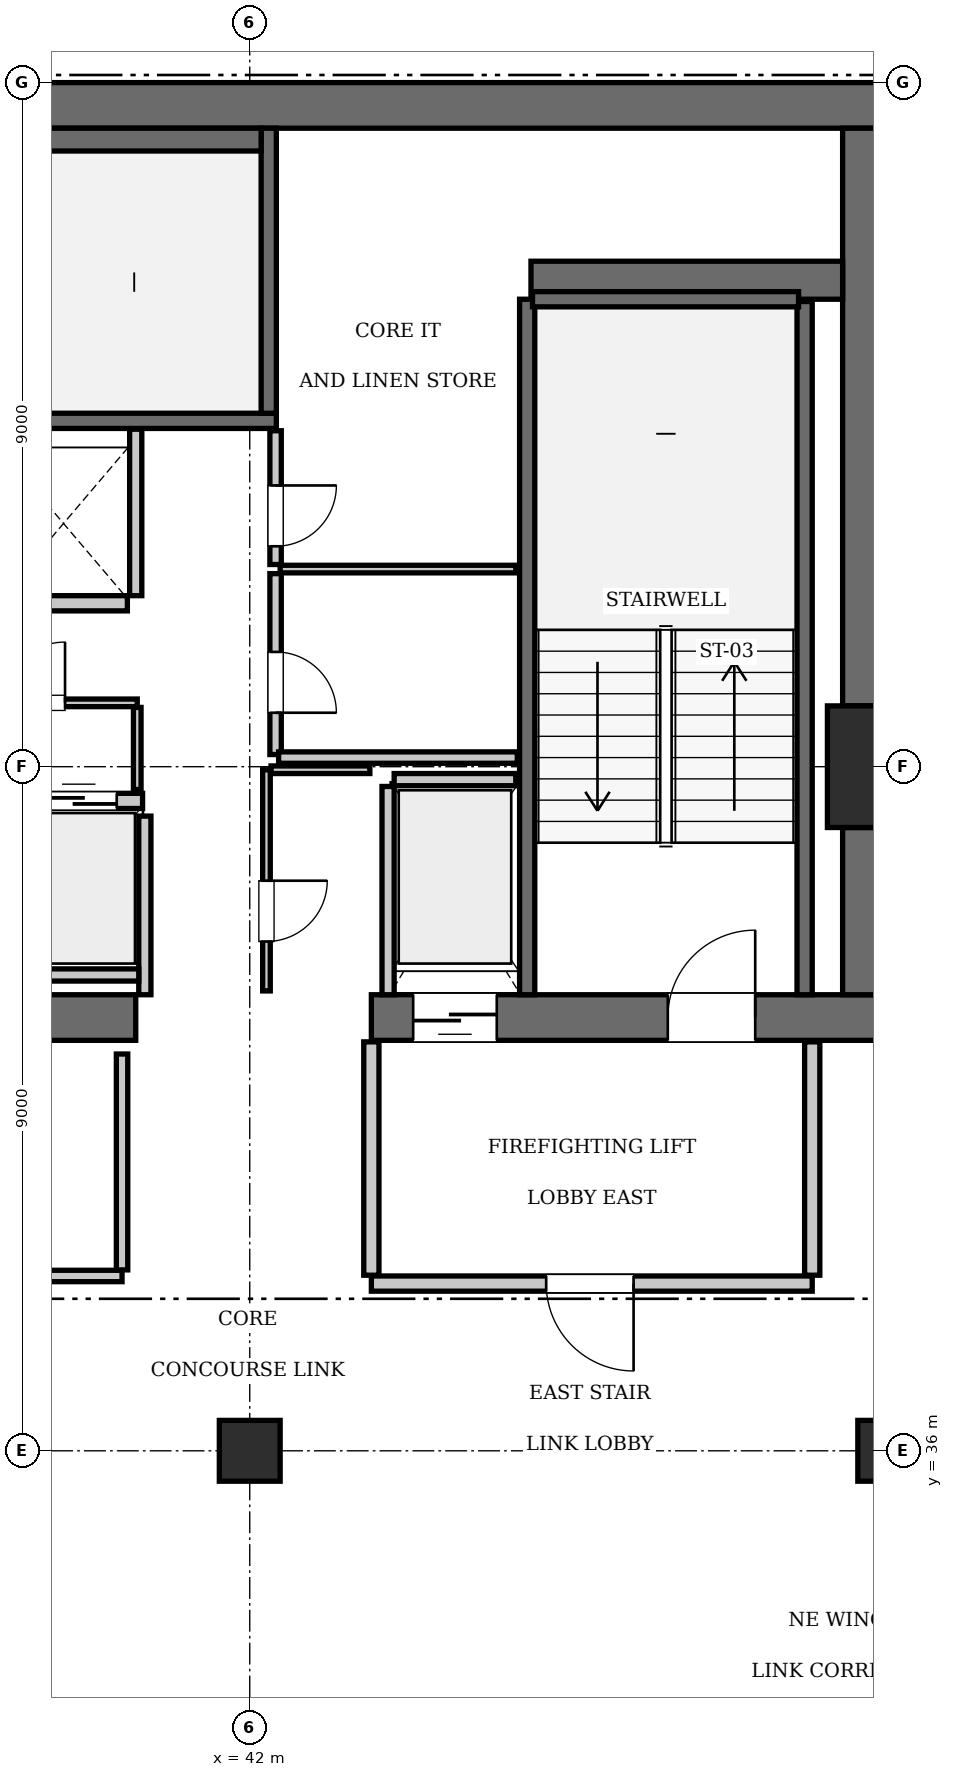
"""IFC4 building model, lengths in metres.
Left out: names, types, materials, properties, quantities, classifications, styles, units other than length and angle.
Written with IfcOpenShell. Run it as: python <this file> out.ifc"""

import sys

from ifc_helpers import new_model, si_unit, direction, frame, frame_2d, origin, origin_2d, place, context, subcontext, project, spatial, rectangle, extrude, element, fill, save


model = new_model("IFC4")
c1 = context("Model", 3, precision=1e-05, world=origin(), true_north=direction((0.0, 1.0)))
c2 = subcontext(c1, "Body", "Model", "MODEL_VIEW")
j1 = project(units=[si_unit("LENGTHUNIT", "METRE"), si_unit("PLANEANGLEUNIT", "RADIAN")], contexts=[c1])
p1 = place(None, origin())
s1 = spatial("IfcSite", under=j1, at=p1, CompositionType="ELEMENT")
p2 = place(p1, origin())
s2 = spatial("IfcBuilding", under=s1, at=p2, CompositionType="ELEMENT")
p3 = place(p2, frame((0.0, 0.0, 254.8)))
s3 = spatial("IfcBuildingStorey", under=s2, at=p3, CompositionType="ELEMENT", Elevation=254.8)
p4 = place(p3, frame((50.4, 45.0, 0.0), z_axis=(0.0, 0.0, 1.0), x_axis=(1.0, 0.0, 0.0)))
e1 = element("IfcColumn", 1, at=p4, inside=s3, PredefinedType="COLUMN", context=c2, shape_type="SweptSolid", body=[
    extrude(rectangle(XDim=1.6, YDim=1.6, at=origin_2d()), origin(), (0.0, 0.0, 1.0), 3.85),
])
p5 = place(p3, frame((25.2, 53.7, 0.0), z_axis=(0.0, 0.0, 1.0), x_axis=(1.0, 0.0, 0.0)))
e2 = element("IfcWall", 2, at=p5, inside=s3, PredefinedType="SHEAR", context=c2, shape_type="SweptSolid", body=[
    extrude(rectangle(XDim=25.2, YDim=0.6, at=frame_2d((12.6, 0.0))), origin(), (0.0, 0.0, 1.0), 3.85),
])
p6 = place(p3, frame((35.1, 41.7, 0.0), z_axis=(0.0, 0.0, 1.0), x_axis=(1.0, 0.0, 0.0)))
e3 = element("IfcWall", 3, at=p6, inside=s3, PredefinedType="SHEAR", context=c2, shape_type="SweptSolid", body=[
    extrude(rectangle(XDim=5.4, YDim=0.6, at=frame_2d((2.7, 0.0))), origin(), (0.0, 0.0, 1.0), 3.85),
])
p7 = place(p3, frame((43.6, 41.7, 0.0), z_axis=(0.0, 0.0, 1.0), x_axis=(1.0, 0.0, 0.0)))
e4 = element("IfcWall", 4, at=p7, inside=s3, PredefinedType="SHEAR", context=c2, shape_type="SweptSolid", body=[
    extrude(rectangle(XDim=6.8, YDim=0.6, at=frame_2d((3.4, 0.0))), origin(), (0.0, 0.0, 1.0), 3.85),
])
p8 = place(p7, frame((3.9, 0.0, 0.0)))
e5 = element("IfcOpeningElement", 5, at=p8, cuts=e4, PredefinedType="OPENING", context=c2, shape_type="SweptSolid", body=[
    extrude(rectangle(XDim=1.15, YDim=2.15, at=frame_2d((0.575, 1.075))), frame((0.0, 0.31, 0.0), z_axis=(0.0, -1.0, 0.0), x_axis=(1.0, 0.0, 0.0)), (0.0, 0.0, 1.0), 0.62),
])
p9 = place(p7, frame((0.55, 0.0, 0.0)))
e6 = element("IfcOpeningElement", 6, at=p9, cuts=e4, PredefinedType="OPENING", context=c2, shape_type="SweptSolid", body=[
    extrude(rectangle(XDim=1.1, YDim=2.2, at=frame_2d((0.55, 1.1))), frame((0.0, 0.31, 0.0), z_axis=(0.0, -1.0, 0.0), x_axis=(1.0, 0.0, 0.0)), (0.0, 0.0, 1.0), 0.62),
])
p10 = place(p3, frame((50.1, 42.0, 0.0), z_axis=(0.0, 0.0, 1.0), x_axis=(0.0, 1.0, 0.0)))
e7 = element("IfcWall", 7, at=p10, inside=s3, PredefinedType="SHEAR", context=c2, shape_type="SweptSolid", body=[
    extrude(rectangle(XDim=2.2, YDim=0.6, at=frame_2d((1.1, 0.0))), origin(), (0.0, 0.0, 1.0), 3.85),
])
p11 = place(p3, frame((50.1, 45.8, 0.0), z_axis=(0.0, 0.0, 1.0), x_axis=(0.0, 1.0, 0.0)))
e8 = element("IfcWall", 8, at=p11, inside=s3, PredefinedType="SHEAR", context=c2, shape_type="SweptSolid", body=[
    extrude(rectangle(XDim=7.6, YDim=0.6, at=frame_2d((3.8, 0.0))), origin(), (0.0, 0.0, 1.0), 3.85),
])
p12 = place(p3, frame((45.7, 51.4, 0.0), z_axis=(0.0, 0.0, 1.0), x_axis=(1.0, 0.0, 0.0)))
e9 = element("IfcWall", 9, at=p12, inside=s3, PredefinedType="SHEAR", context=c2, shape_type="SweptSolid", body=[
    extrude(rectangle(XDim=4.1, YDim=0.5, at=frame_2d((2.05, 0.0))), origin(), (0.0, 0.0, 1.0), 3.85),
])
for number, where, z_axis, x_axis in (
    (10, (42.0, 36.0, 0.0), (0.0, 0.0, 1.0), (1.0, 0.0, 0.0)),
    (11, (50.4, 36.0, 0.0), (0.0, 0.0, 1.0), (1.0, 0.0, 0.0)),
):
    element("IfcColumn", number, at=place(p3, frame(where, z_axis=z_axis, x_axis=x_axis)), inside=s3, PredefinedType="COLUMN", context=c2, shape_type="SweptSolid", body=[
        extrude(rectangle(XDim=0.8, YDim=0.8, at=origin_2d()), origin(), (0.0, 0.0, 1.0), 3.85),
    ])
p13 = place(p3, frame((33.25, 49.55, 0.0), z_axis=(0.0, 0.0, 1.0), x_axis=(1.0, 0.0, 0.0)))
e12 = element("IfcWall", 12, at=p13, inside=s3, PredefinedType="SOLIDWALL", context=c2, shape_type="SweptSolid", body=[
    extrude(rectangle(XDim=9.1, YDim=0.2, at=frame_2d((4.55, 0.0))), origin(), (0.0, 0.0, 1.0), 3.61),
])
p14 = place(p3, frame((42.25, 49.65, 0.0), z_axis=(0.0, 0.0, 1.0), x_axis=(0.0, 1.0, 0.0)))
e13 = element("IfcWall", 13, at=p14, inside=s3, PredefinedType="SOLIDWALL", context=c2, shape_type="SweptSolid", body=[
    extrude(rectangle(XDim=3.75, YDim=0.2, at=frame_2d((1.875, 0.0))), origin(), (0.0, 0.0, 1.0), 3.61),
])
p15 = place(p3, frame((33.45, 53.25, 0.0), z_axis=(0.0, 0.0, 1.0), x_axis=(1.0, 0.0, 0.0)))
e14 = element("IfcWall", 14, at=p15, inside=s3, PredefinedType="SOLIDWALL", context=c2, shape_type="SweptSolid", body=[
    extrude(rectangle(XDim=8.7, YDim=0.3, at=frame_2d((4.35, 0.0))), origin(), (0.0, 0.0, 1.0), 3.61),
])
p16 = place(p3, frame((45.65, 42.0, 0.0), z_axis=(0.0, 0.0, 1.0), x_axis=(0.0, 1.0, 0.0)))
e15 = element("IfcWall", 15, at=p16, inside=s3, PredefinedType="SOLIDWALL", context=c2, shape_type="SweptSolid", body=[
    extrude(rectangle(XDim=9.15, YDim=0.2, at=frame_2d((4.575, 0.0))), origin(), (0.0, 0.0, 1.0), 3.61),
])
p17 = place(p3, frame((49.3, 42.0, 0.0), z_axis=(0.0, 0.0, 1.0), x_axis=(0.0, 1.0, 0.0)))
e16 = element("IfcWall", 16, at=p17, inside=s3, PredefinedType="SOLIDWALL", context=c2, shape_type="SweptSolid", body=[
    extrude(rectangle(XDim=9.12, YDim=0.2, at=frame_2d((4.56, 0.0))), origin(), (0.0, 0.0, 1.0), 3.61),
])
p18 = place(p3, frame((45.72, 51.15, 0.0), z_axis=(0.0, 0.0, 1.0), x_axis=(1.0, 0.0, 0.0)))
e17 = element("IfcWall", 17, at=p18, inside=s3, PredefinedType="SOLIDWALL", context=c2, shape_type="SweptSolid", body=[
    extrude(rectangle(XDim=3.5, YDim=0.2, at=frame_2d((1.75, 0.0))), origin(), (0.0, 0.0, 1.0), 3.61),
])
p19 = place(p3, frame((38.91, 44.55, 0.0), z_axis=(0.0, 0.0, 1.0), x_axis=(1.0, 0.0, 0.0)))
e18 = element("IfcWall", 18, at=p19, inside=s3, PredefinedType="SOLIDWALL", context=c2, shape_type="SweptSolid", body=[
    extrude(rectangle(XDim=1.68, YDim=0.2, at=frame_2d((0.84, 0.0))), origin(), (0.0, 0.0, 1.0), 3.61),
])
p20 = place(p19, frame((0.34, 0.0, 0.0)))
e19 = element("IfcOpeningElement", 19, at=p20, cuts=e18, PredefinedType="OPENING", context=c2, shape_type="SweptSolid", body=[
    extrude(rectangle(XDim=1.0, YDim=2.15, at=frame_2d((0.5, 1.075))), frame((0.0, 0.11, 0.0), z_axis=(0.0, -1.0, 0.0), x_axis=(1.0, 0.0, 0.0)), (0.0, 0.0, 1.0), 0.22),
])
p21 = place(p3, frame((38.71, 47.15, 0.0), z_axis=(0.0, 0.0, 1.0), x_axis=(1.0, 0.0, 0.0)))
e20 = element("IfcWall", 20, at=p21, inside=s3, PredefinedType="SOLIDWALL", context=c2, shape_type="SweptSolid", body=[
    extrude(rectangle(XDim=1.68, YDim=0.2, at=frame_2d((0.84, 0.0))), origin(), (0.0, 0.0, 1.0), 3.61),
])
p22 = place(p3, frame((43.9, 44.83, 0.0), z_axis=(0.0, 0.0, 1.0), x_axis=(1.0, 0.0, 0.0)))
e21 = element("IfcWall", 21, at=p22, inside=s3, PredefinedType="SOLIDWALL", context=c2, shape_type="SweptSolid", body=[
    extrude(rectangle(XDim=1.6, YDim=0.16, at=frame_2d((0.8, 0.0))), origin(), (0.0, 0.0, 1.0), 3.61),
])
p23 = place(p3, frame((43.82, 42.0, 0.0), z_axis=(0.0, 0.0, 1.0), x_axis=(0.0, 1.0, 0.0)))
e22 = element("IfcWall", 22, at=p23, inside=s3, PredefinedType="SOLIDWALL", context=c2, shape_type="SweptSolid", body=[
    extrude(rectangle(XDim=2.74, YDim=0.16, at=frame_2d((1.37, 0.0))), origin(), (0.0, 0.0, 1.0), 3.61),
])
p24 = place(p3, frame((40.62, 42.0, 0.0), z_axis=(0.0, 0.0, 1.0), x_axis=(0.0, 1.0, 0.0)))
e23 = element("IfcWall", 23, at=p24, inside=s3, PredefinedType="SOLIDWALL", context=c2, shape_type="SweptSolid", body=[
    extrude(rectangle(XDim=2.35, YDim=0.16, at=frame_2d((1.175, 0.0))), origin(), (0.0, 0.0, 1.0), 3.61),
])
p25 = place(p3, frame((35.52, 42.26, 0.0), z_axis=(0.0, 0.0, 1.0), x_axis=(1.0, 0.0, 0.0)))
e24 = element("IfcWall", 24, at=p25, inside=s3, PredefinedType="SOLIDWALL", context=c2, shape_type="SweptSolid", body=[
    extrude(rectangle(XDim=5.02, YDim=0.16, at=frame_2d((2.51, 0.0))), origin(), (0.0, 0.0, 1.0), 3.61),
])
p26 = place(p3, frame((40.5, 47.25, 0.0), z_axis=(0.0, 0.0, 1.0), x_axis=(0.0, 1.0, 0.0)))
e25 = element("IfcWall", 25, at=p26, inside=s3, PredefinedType="SOLIDWALL", context=c2, shape_type="SweptSolid", body=[
    extrude(rectangle(XDim=2.19, YDim=0.16, at=frame_2d((1.095, 0.0))), origin(), (0.0, 0.0, 1.0), 3.61),
])
p27 = place(p3, frame((43.6, 38.2, 0.0), z_axis=(0.0, 0.0, 1.0), x_axis=(1.0, 0.0, 0.0)))
e26 = element("IfcWall", 26, at=p27, inside=s3, PredefinedType="PARTITIONING", context=c2, shape_type="SweptSolid", body=[
    extrude(rectangle(XDim=5.8, YDim=0.2, at=frame_2d((2.9, 0.0))), origin(), (0.0, 0.0, 1.0), 3.61),
])
p28 = place(p27, frame((2.3, 0.0, 0.0)))
e27 = element("IfcOpeningElement", 27, at=p28, cuts=e26, PredefinedType="OPENING", context=c2, shape_type="SweptSolid", body=[
    extrude(rectangle(XDim=1.15, YDim=2.15, at=frame_2d((0.575, 1.075))), frame((0.0, 0.11, 0.0), z_axis=(0.0, -1.0, 0.0), x_axis=(1.0, 0.0, 0.0)), (0.0, 0.0, 1.0), 0.22),
])
for number, where, z_axis, x_axis in (
    (28, (43.6, 38.31, 0.0), (0.0, 0.0, 1.0), (0.0, 1.0, 0.0)),
    (29, (49.4, 38.31, 0.0), (0.0, 0.0, 1.0), (0.0, 1.0, 0.0)),
):
    element("IfcWall", number, at=place(p3, frame(where, z_axis=z_axis, x_axis=x_axis)), inside=s3, PredefinedType="PARTITIONING", context=c2, shape_type="SweptSolid", body=[
        extrude(rectangle(XDim=3.07, YDim=0.2, at=frame_2d((1.535, 0.0))), origin(), (0.0, 0.0, 1.0), 3.61),
    ])
p29 = place(p3, frame((38.02, 45.84, 0.0), z_axis=(0.0, 0.0, 1.0), x_axis=(1.0, 0.0, 0.0)))
e30 = element("IfcWall", 30, at=p29, inside=s3, PredefinedType="PARTITIONING", context=c2, shape_type="SweptSolid", body=[
    extrude(rectangle(XDim=2.5, YDim=0.1, at=frame_2d((1.25, 0.0))), origin(), (0.0, 0.0, 1.0), 3.61),
])
p30 = place(p29, frame((0.75, 0.0, 0.0)))
e31 = element("IfcOpeningElement", 31, at=p30, cuts=e30, PredefinedType="OPENING", context=c2, shape_type="SweptSolid", body=[
    extrude(rectangle(XDim=0.8, YDim=2.05, at=frame_2d((0.4, 1.025))), frame((0.0, 0.06, 0.0), z_axis=(0.0, -1.0, 0.0), x_axis=(1.0, 0.0, 0.0)), (0.0, 0.0, 1.0), 0.12),
])
p31 = place(p3, frame((40.52, 44.7, 0.0), z_axis=(0.0, 0.0, 1.0), x_axis=(0.0, 1.0, 0.0)))
e32 = element("IfcWall", 32, at=p31, inside=s3, PredefinedType="PARTITIONING", context=c2, shape_type="SweptSolid", body=[
    extrude(rectangle(XDim=1.08, YDim=0.1, at=frame_2d((0.54, 0.0))), origin(), (0.0, 0.0, 1.0), 3.61),
])
p32 = place(p3, frame((42.22, 42.05, 0.0), z_axis=(0.0, 0.0, 1.0), x_axis=(0.0, 1.0, 0.0)))
e33 = element("IfcWall", 33, at=p32, inside=s3, PredefinedType="PARTITIONING", context=c2, shape_type="SweptSolid", body=[
    extrude(rectangle(XDim=2.91, YDim=0.1, at=frame_2d((1.455, 0.0))), origin(), (0.0, 0.0, 1.0), 3.61),
])
p33 = place(p32, frame((0.65, 0.0, 0.0)))
e34 = element("IfcOpeningElement", 34, at=p33, cuts=e33, PredefinedType="OPENING", context=c2, shape_type="SweptSolid", body=[
    extrude(rectangle(XDim=0.8, YDim=2.05, at=frame_2d((0.4, 1.025))), frame((0.0, 0.06, 0.0), z_axis=(0.0, -1.0, 0.0), x_axis=(1.0, 0.0, 0.0)), (0.0, 0.0, 1.0), 0.12),
])
p34 = place(p3, frame((42.28, 44.96, 0.0), z_axis=(0.0, 0.0, 1.0), x_axis=(1.0, 0.0, 0.0)))
e35 = element("IfcWall", 35, at=p34, inside=s3, PredefinedType="PARTITIONING", context=c2, shape_type="SweptSolid", body=[
    extrude(rectangle(XDim=1.3, YDim=0.1, at=frame_2d((0.65, 0.0))), origin(), (0.0, 0.0, 1.0), 3.61),
])
p35 = place(p3, frame((42.34, 45.16, 0.0), z_axis=(0.0, 0.0, 1.0), x_axis=(0.0, 1.0, 0.0)))
e36 = element("IfcWall", 36, at=p35, inside=s3, PredefinedType="PARTITIONING", context=c2, shape_type="SweptSolid", body=[
    extrude(rectangle(XDim=2.38, YDim=0.15, at=frame_2d((1.19, 0.0))), origin(), (0.0, 0.0, 1.0), 3.61),
])
p36 = place(p35, frame((0.55, 0.0, 0.0)))
e37 = element("IfcOpeningElement", 37, at=p36, cuts=e36, PredefinedType="OPENING", context=c2, shape_type="SweptSolid", body=[
    extrude(rectangle(XDim=0.8, YDim=2.05, at=frame_2d((0.4, 1.025))), frame((0.0, 0.085, 0.0), z_axis=(0.0, -1.0, 0.0), x_axis=(1.0, 0.0, 0.0)), (0.0, 0.0, 1.0), 0.17),
])
p37 = place(p3, frame((42.34, 47.66, 0.0), z_axis=(0.0, 0.0, 1.0), x_axis=(0.0, 1.0, 0.0)))
e38 = element("IfcWall", 38, at=p37, inside=s3, PredefinedType="PARTITIONING", context=c2, shape_type="SweptSolid", body=[
    extrude(rectangle(XDim=1.76, YDim=0.15, at=frame_2d((0.88, 0.0))), origin(), (0.0, 0.0, 1.0), 3.61),
])
p38 = place(p37, frame((0.24, 0.0, 0.0)))
e39 = element("IfcOpeningElement", 39, at=p38, cuts=e38, PredefinedType="OPENING", context=c2, shape_type="SweptSolid", body=[
    extrude(rectangle(XDim=0.8, YDim=2.05, at=frame_2d((0.4, 1.025))), frame((0.0, 0.085, 0.0), z_axis=(0.0, -1.0, 0.0), x_axis=(1.0, 0.0, 0.0)), (0.0, 0.0, 1.0), 0.17),
])
p39 = place(p3, frame((42.4, 47.6, 0.0), z_axis=(0.0, 0.0, 1.0), x_axis=(1.0, 0.0, 0.0)))
e40 = element("IfcWall", 40, at=p39, inside=s3, PredefinedType="PARTITIONING", context=c2, shape_type="SweptSolid", body=[
    extrude(rectangle(XDim=3.1, YDim=0.1, at=frame_2d((1.55, 0.0))), origin(), (0.0, 0.0, 1.0), 3.61),
])
p40 = place(p3, frame((42.38, 45.12, 0.0), z_axis=(0.0, 0.0, 1.0), x_axis=(1.0, 0.0, 0.0)))
e41 = element("IfcWall", 41, at=p40, inside=s3, PredefinedType="PARTITIONING", context=c2, shape_type="SweptSolid", body=[
    extrude(rectangle(XDim=3.14, YDim=0.15, at=frame_2d((1.57, 0.0))), origin(), (0.0, 0.0, 1.0), 3.61),
])
p41 = place(p3, frame((37.38, 38.3, 0.0), z_axis=(0.0, 0.0, 1.0), x_axis=(1.0, 0.0, 0.0)))
e42 = element("IfcWall", 42, at=p41, inside=s3, PredefinedType="PARTITIONING", context=c2, shape_type="SweptSolid", body=[
    extrude(rectangle(XDim=2.94, YDim=0.15, at=frame_2d((1.47, 0.0))), origin(), (0.0, 0.0, 1.0), 3.61),
])
p42 = place(p41, frame((1.0, 0.0, 0.0)))
e43 = element("IfcOpeningElement", 43, at=p42, cuts=e42, PredefinedType="OPENING", context=c2, shape_type="SweptSolid", body=[
    extrude(rectangle(XDim=0.8, YDim=2.05, at=frame_2d((0.4, 1.025))), frame((0.0, 0.085, 0.0), z_axis=(0.0, -1.0, 0.0), x_axis=(1.0, 0.0, 0.0)), (0.0, 0.0, 1.0), 0.17),
])
p43 = place(p3, frame((40.32, 38.38, 0.0), z_axis=(0.0, 0.0, 1.0), x_axis=(0.0, 1.0, 0.0)))
e44 = element("IfcWall", 44, at=p43, inside=s3, PredefinedType="PARTITIONING", context=c2, shape_type="SweptSolid", body=[
    extrude(rectangle(XDim=2.84, YDim=0.15, at=frame_2d((1.42, 0.0))), origin(), (0.0, 0.0, 1.0), 3.61),
])
p44 = place(p8, origin())
e45 = element("IfcDoor", 45, at=p44, inside=s3, OperationType="SINGLE_SWING_RIGHT", PredefinedType="DOOR", context=c2, shape_type="SweptSolid", body=[
    extrude(rectangle(XDim=1.15, YDim=2.15, at=frame_2d((0.575, 1.075))), frame((0.0, 0.025, 0.0), z_axis=(0.0, -1.0, 0.0), x_axis=(1.0, 0.0, 0.0)), (0.0, 0.0, 1.0), 0.05),
])
fill(e5, e45)
p45 = place(p20, origin())
e46 = element("IfcDoor", 46, at=p45, inside=s3, OperationType="SLIDING_TO_LEFT", PredefinedType="DOOR", context=c2, shape_type="SweptSolid", body=[
    extrude(rectangle(XDim=1.0, YDim=2.15, at=frame_2d((0.5, 1.075))), frame((0.0, 0.025, 0.0), z_axis=(0.0, -1.0, 0.0), x_axis=(1.0, 0.0, 0.0)), (0.0, 0.0, 1.0), 0.05),
])
fill(e19, e46)
p46 = place(p9, frame((1.1, 0.0, 0.0), z_axis=(0.0, 0.0, 1.0), x_axis=(-1.0, 0.0, 0.0)))
e47 = element("IfcDoor", 47, at=p46, inside=s3, OperationType="SLIDING_TO_LEFT", PredefinedType="DOOR", context=c2, shape_type="SweptSolid", body=[
    extrude(rectangle(XDim=1.1, YDim=2.2, at=frame_2d((0.55, 1.1))), frame((0.0, 0.025, 0.0), z_axis=(0.0, -1.0, 0.0), x_axis=(1.0, 0.0, 0.0)), (0.0, 0.0, 1.0), 0.05),
])
fill(e6, e47)
p47 = place(p28, frame((1.15, 0.0, 0.0), z_axis=(0.0, 0.0, 1.0), x_axis=(-1.0, 0.0, 0.0)))
e48 = element("IfcDoor", 48, at=p47, inside=s3, OperationType="SINGLE_SWING_LEFT", PredefinedType="DOOR", context=c2, shape_type="SweptSolid", body=[
    extrude(rectangle(XDim=1.15, YDim=2.15, at=frame_2d((0.575, 1.075))), frame((0.0, 0.025, 0.0), z_axis=(0.0, -1.0, 0.0), x_axis=(1.0, 0.0, 0.0)), (0.0, 0.0, 1.0), 0.05),
])
fill(e27, e48)
p48 = place(p30, origin())
e49 = element("IfcDoor", 49, at=p48, inside=s3, OperationType="SINGLE_SWING_RIGHT", PredefinedType="DOOR", context=c2, shape_type="SweptSolid", body=[
    extrude(rectangle(XDim=0.8, YDim=2.05, at=frame_2d((0.4, 1.025))), frame((0.0, 0.025, 0.0), z_axis=(0.0, -1.0, 0.0), x_axis=(1.0, 0.0, 0.0)), (0.0, 0.0, 1.0), 0.05),
])
fill(e31, e49)
p49 = place(p33, frame((0.8, 0.0, 0.0), z_axis=(0.0, 0.0, 1.0), x_axis=(-1.0, 0.0, 0.0)))
e50 = element("IfcDoor", 50, at=p49, inside=s3, OperationType="SINGLE_SWING_LEFT", PredefinedType="DOOR", context=c2, shape_type="SweptSolid", body=[
    extrude(rectangle(XDim=0.8, YDim=2.05, at=frame_2d((0.4, 1.025))), frame((0.0, 0.025, 0.0), z_axis=(0.0, -1.0, 0.0), x_axis=(1.0, 0.0, 0.0)), (0.0, 0.0, 1.0), 0.05),
])
fill(e34, e50)
p50 = place(p36, frame((0.8, 0.0, 0.0), z_axis=(0.0, 0.0, 1.0), x_axis=(-1.0, 0.0, 0.0)))
e51 = element("IfcDoor", 51, at=p50, inside=s3, OperationType="SINGLE_SWING_RIGHT", PredefinedType="DOOR", context=c2, shape_type="SweptSolid", body=[
    extrude(rectangle(XDim=0.8, YDim=2.05, at=frame_2d((0.4, 1.025))), frame((0.0, 0.025, 0.0), z_axis=(0.0, -1.0, 0.0), x_axis=(1.0, 0.0, 0.0)), (0.0, 0.0, 1.0), 0.05),
])
fill(e37, e51)
p51 = place(p38, frame((0.8, 0.0, 0.0), z_axis=(0.0, 0.0, 1.0), x_axis=(-1.0, 0.0, 0.0)))
e52 = element("IfcDoor", 52, at=p51, inside=s3, OperationType="SINGLE_SWING_LEFT", PredefinedType="DOOR", context=c2, shape_type="SweptSolid", body=[
    extrude(rectangle(XDim=0.8, YDim=2.05, at=frame_2d((0.4, 1.025))), frame((0.0, 0.025, 0.0), z_axis=(0.0, -1.0, 0.0), x_axis=(1.0, 0.0, 0.0)), (0.0, 0.0, 1.0), 0.05),
])
fill(e39, e52)
save(model, sys.argv[1])
